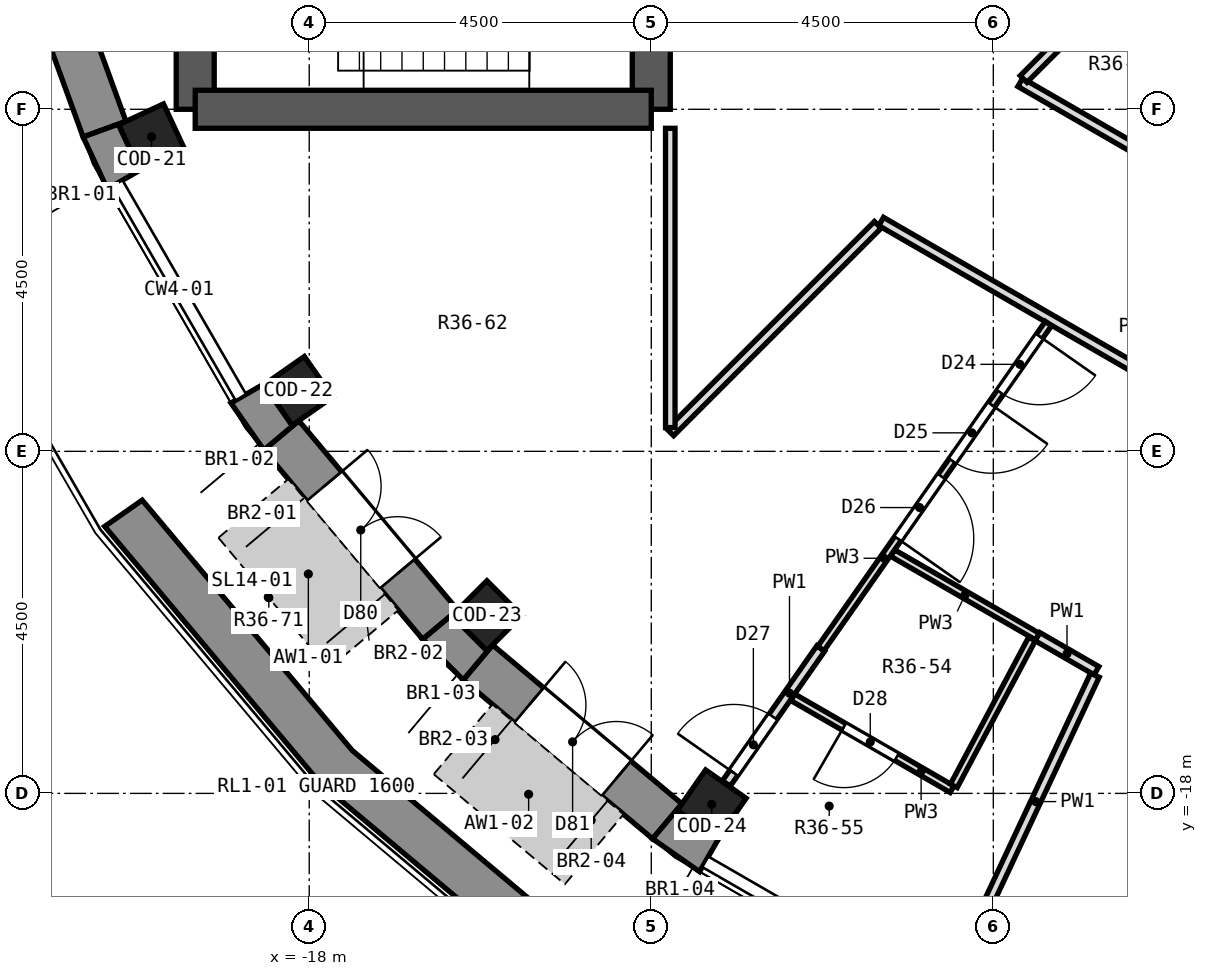
"""IFC4 building model, lengths in metres.
Left out: names, types, materials, properties, quantities, classifications, styles, units other than length and angle.
Written with IfcOpenShell. Run it as: python <this file> out.ifc"""

import sys

from ifc_helpers import new_model, si_unit, direction, frame, frame_2d, origin, origin_2d, place, context, subcontext, project, spatial, polyline, rectangle, outline, extrude, element, fill, save


model = new_model("IFC4")
c1 = context("Model", 3, precision=1e-05, world=origin(), true_north=direction((0.0, 1.0)))
c2 = subcontext(c1, "Body", "Model", "MODEL_VIEW")
j1 = project(units=[si_unit("LENGTHUNIT", "METRE"), si_unit("PLANEANGLEUNIT", "RADIAN")], contexts=[c1])
p1 = place(None, origin())
s1 = spatial("IfcSite", under=j1, at=p1, CompositionType="ELEMENT")
p2 = place(p1, origin())
s2 = spatial("IfcBuilding", under=s1, at=p2, CompositionType="ELEMENT")
p3 = place(p2, frame((0.0, 0.0, 259.4)))
s3 = spatial("IfcBuildingStorey", under=s2, at=p3, CompositionType="ELEMENT", Elevation=259.4)
for number, where, z_axis, x_axis in (
    (1, (-20.075, -9.361, 0.0), (0.0, 0.0, 1.0), (-0.906, -0.423, 0.0)),
    (2, (-18.144, -12.705, 0.0), (0.0, 0.0, 1.0), (-0.819, -0.574, 0.0)),
    (3, (-15.662, -15.662, 0.0), (0.0, 0.0, 1.0), (-0.707, -0.707, 0.0)),
    (4, (-12.705, -18.144, 0.0), (0.0, 0.0, 1.0), (-0.574, -0.819, 0.0)),
):
    element("IfcColumn", number, at=place(p3, frame(where, z_axis=z_axis, x_axis=x_axis)), inside=s3, PredefinedType="COLUMN", context=c2, shape_type="SweptSolid", body=[
        extrude(rectangle(XDim=0.65, YDim=0.65, at=origin_2d()), origin(), (0.0, 0.0, 1.0), 3.3),
    ])
p4 = place(p3, frame((-13.5, -9.0, 0.0), z_axis=(0.0, 0.0, 1.0), x_axis=(0.0, 1.0, 0.0)))
e5 = element("IfcWall", 5, at=p4, inside=s3, PredefinedType="SHEAR", context=c2, shape_type="SweptSolid", body=[
    extrude(rectangle(XDim=18.0, YDim=0.5, at=frame_2d((9.0, 0.0))), origin(), (0.0, 0.0, 1.0), 3.3),
])
p5 = place(p4, frame((15.4, 0.0, 0.0)))
e6 = element("IfcOpeningElement", 6, at=p5, cuts=e5, PredefinedType="OPENING", context=c2, shape_type="SweptSolid", body=[
    extrude(rectangle(XDim=1.2, YDim=2.1, at=frame_2d((0.6, 1.05))), frame((0.0, 0.262, 0.0), z_axis=(0.0, -1.0, 0.0), x_axis=(1.0, 0.0, 0.0)), (0.0, 0.0, 1.0), 0.524),
])
p6 = place(p4, frame((1.4, 0.0, 0.0)))
e7 = element("IfcOpeningElement", 7, at=p6, cuts=e5, PredefinedType="OPENING", context=c2, shape_type="SweptSolid", body=[
    extrude(rectangle(XDim=1.2, YDim=2.1, at=frame_2d((0.6, 1.05))), frame((0.0, 0.262, 0.0), z_axis=(0.0, -1.0, 0.0), x_axis=(1.0, 0.0, 0.0)), (0.0, 0.0, 1.0), 0.524),
])
p7 = place(p4, frame((7.5, 0.0, 0.0)))
e8 = element("IfcOpeningElement", 8, at=p7, cuts=e5, PredefinedType="OPENING", context=c2, shape_type="SweptSolid", body=[
    extrude(rectangle(XDim=3.0, YDim=2.4, at=frame_2d((1.5, 1.2))), frame((0.0, 0.262, 0.0), z_axis=(0.0, -1.0, 0.0), x_axis=(1.0, 0.0, 0.0)), (0.0, 0.0, 1.0), 0.524),
])
p8 = place(p3, frame((-19.5, -9.0, 0.0), z_axis=(0.0, 0.0, 1.0), x_axis=(0.0, 1.0, 0.0)))
e9 = element("IfcWall", 9, at=p8, inside=s3, PredefinedType="SHEAR", context=c2, shape_type="SweptSolid", body=[
    extrude(rectangle(XDim=18.0, YDim=0.5, at=frame_2d((9.0, 0.0))), origin(), (0.0, 0.0, 1.0), 3.3),
])
p9 = place(p8, frame((9.45, 0.0, 0.0)))
e10 = element("IfcOpeningElement", 10, at=p9, cuts=e9, PredefinedType="OPENING", context=c2, shape_type="SweptSolid", body=[
    extrude(rectangle(XDim=0.9, YDim=2.1, at=frame_2d((0.45, 1.05))), frame((0.0, 0.262, 0.0), z_axis=(0.0, -1.0, 0.0), x_axis=(1.0, 0.0, 0.0)), (0.0, 0.0, 1.0), 0.524),
])
p10 = place(p8, frame((7.65, 0.0, 0.0)))
e11 = element("IfcOpeningElement", 11, at=p10, cuts=e9, PredefinedType="OPENING", context=c2, shape_type="SweptSolid", body=[
    extrude(rectangle(XDim=0.9, YDim=2.1, at=frame_2d((0.45, 1.05))), frame((0.0, 0.262, 0.0), z_axis=(0.0, -1.0, 0.0), x_axis=(1.0, 0.0, 0.0)), (0.0, 0.0, 1.0), 0.524),
])
p11 = place(p3, frame((-13.5, -9.0, 0.0), z_axis=(0.0, 0.0, 1.0), x_axis=(-1.0, 0.0, 0.0)))
e12 = element("IfcWall", 12, at=p11, inside=s3, PredefinedType="SHEAR", context=c2, shape_type="SweptSolid", body=[
    extrude(rectangle(XDim=6.0, YDim=0.5, at=frame_2d((3.0, 0.0))), origin(), (0.0, 0.0, 1.0), 3.3),
])
p12 = place(p3, frame((-21.805, -6.206, 0.0), z_axis=(0.0, 0.0, 1.0), x_axis=(0.342056509473, -0.939679383794, 0.0)))
e13 = element("IfcWall", 13, at=p12, inside=s3, PredefinedType="SOLIDWALL", context=c2, shape_type="SweptSolid", body=[
    extrude(rectangle(XDim=3.252, YDim=0.6, at=frame_2d((1.626, 0.0))), origin(), (0.0, 0.0, 1.0), 2.9),
])
p13 = place(p3, frame((-18.367, -13.29, 0.0), z_axis=(0.0, 0.0, 1.0), x_axis=(0.64277291405, -0.766056773982, 0.0)))
e14 = element("IfcWall", 14, at=p13, inside=s3, PredefinedType="SOLIDWALL", context=c2, shape_type="SweptSolid", body=[
    extrude(rectangle(XDim=3.252, YDim=0.6, at=frame_2d((1.626, 0.0))), origin(), (0.0, 0.0, 1.0), 2.9),
])
p14 = place(p13, frame((0.876, 0.0, 0.0)))
e15 = element("IfcOpeningElement", 15, at=p14, cuts=e14, PredefinedType="OPENING", context=c2, shape_type="SweptSolid", body=[
    extrude(rectangle(XDim=1.5, YDim=2.4, at=frame_2d((0.75, 1.2))), frame((0.0, 0.312, 0.0), z_axis=(0.0, -1.0, 0.0), x_axis=(1.0, 0.0, 0.0)), (0.0, 0.0, 1.0), 0.624),
])
p15 = place(p3, frame((-15.781, -16.277, 0.0), z_axis=(0.0, 0.0, 1.0), x_axis=(0.766056773982, -0.64277291405, 0.0)))
e16 = element("IfcWall", 16, at=p15, inside=s3, PredefinedType="SOLIDWALL", context=c2, shape_type="SweptSolid", body=[
    extrude(rectangle(XDim=3.252, YDim=0.6, at=frame_2d((1.626, 0.0))), origin(), (0.0, 0.0, 1.0), 2.9),
])
p16 = place(p15, frame((0.876, 0.0, 0.0)))
e17 = element("IfcOpeningElement", 17, at=p16, cuts=e16, PredefinedType="OPENING", context=c2, shape_type="SweptSolid", body=[
    extrude(rectangle(XDim=1.5, YDim=2.4, at=frame_2d((0.75, 1.2))), frame((0.0, 0.312, 0.0), z_axis=(0.0, -1.0, 0.0), x_axis=(1.0, 0.0, 0.0)), (0.0, 0.0, 1.0), 0.624),
])
p17 = place(p3, origin())
e18 = element("IfcWall", 18, at=p17, inside=s3, PredefinedType="SOLIDWALL", context=c2, shape_type="SweptSolid", body=[
    extrude(outline(polyline([(-20.975, -9.364), (-20.656, -10.048), (-20.136, -9.748), (-20.232, -9.793), (-20.507, -9.204), (-20.411, -9.159), (-20.975, -9.364)])), origin(), (0.0, 0.0, 1.0), 2.9),
])
p18 = place(p3, origin())
e19 = element("IfcWall", 19, at=p18, inside=s3, PredefinedType="SOLIDWALL", context=c2, shape_type="SweptSolid", body=[
    extrude(outline(polyline([(-19.03, -12.864), (-18.597, -13.482), (-18.137, -13.097), (-18.224, -13.157), (-18.597, -12.625), (-18.51, -12.564), (-19.03, -12.864)])), origin(), (0.0, 0.0, 1.0), 2.9),
])
p19 = place(p3, origin())
e20 = element("IfcWall", 20, at=p19, inside=s3, PredefinedType="SOLIDWALL", context=c2, shape_type="SweptSolid", body=[
    extrude(outline(polyline([(-15.973, -16.507), (-15.588, -16.047), (-15.662, -16.122), (-16.122, -15.662), (-16.047, -15.588), (-16.507, -15.973), (-15.973, -16.507)])), origin(), (0.0, 0.0, 1.0), 2.9),
])
p20 = place(p3, origin())
e21 = element("IfcWall", 21, at=p20, inside=s3, PredefinedType="SOLIDWALL", context=c2, shape_type="SweptSolid", body=[
    extrude(outline(polyline([(-12.864, -19.03), (-12.564, -18.51), (-12.625, -18.597), (-13.157, -18.224), (-13.097, -18.137), (-13.482, -18.597), (-12.864, -19.03)])), origin(), (0.0, 0.0, 1.0), 2.9),
])
p21 = place(p3, origin())
e22 = element("IfcWall", 22, at=p21, inside=s3, PredefinedType="PARAPET", context=c2, shape_type="SweptSolid", body=[
    extrude(outline(polyline([(-20.691, -14.488), (-17.861, -17.861), (-14.488, -20.691), (-14.142, -20.197), (-17.435, -17.435), (-20.197, -14.142), (-20.691, -14.488)])), origin(), (0.0, 0.0, 1.0), 0.5),
])
p22 = place(p3, frame((-11.639, -16.735, 0.0), z_axis=(0.0, 0.0, 1.0), x_axis=(0.866093196455, -0.499882561262, 0.0)))
e23 = element("IfcWall", 23, at=p22, inside=s3, PredefinedType="PARTITIONING", context=c2, shape_type="SweptSolid", body=[
    extrude(rectangle(XDim=2.42, YDim=0.1, at=frame_2d((1.21, 0.0))), origin(), (0.0, 0.0, 1.0), 2.9),
])
p23 = place(p22, frame((0.778, 0.0, 0.0)))
e24 = element("IfcOpeningElement", 24, at=p23, cuts=e23, PredefinedType="OPENING", context=c2, shape_type="SweptSolid", body=[
    extrude(rectangle(XDim=0.8, YDim=2.1, at=frame_2d((0.4, 1.05))), frame((0.0, 0.062, 0.0), z_axis=(0.0, -1.0, 0.0), x_axis=(1.0, 0.0, 0.0)), (0.0, 0.0, 1.0), 0.124),
])
p24 = place(p3, frame((-10.324, -14.838, 0.0), z_axis=(0.0, 0.0, 1.0), x_axis=(0.866035918664, -0.499981787252, 0.0)))
e25 = element("IfcWall", 25, at=p24, inside=s3, PredefinedType="PARTITIONING", context=c2, shape_type="SweptSolid", body=[
    extrude(rectangle(XDim=2.2, YDim=0.1, at=frame_2d((1.1, 0.0))), origin(), (0.0, 0.0, 1.0), 2.9),
])
p25 = place(p3, frame((-8.419, -15.938, 0.0), z_axis=(0.0, 0.0, 1.0), x_axis=(0.866053945006, -0.499950561895, 0.0)))
e26 = element("IfcWall", 26, at=p25, inside=s3, PredefinedType="PARTITIONING", context=c2, shape_type="SweptSolid", body=[
    extrude(rectangle(XDim=0.896, YDim=0.125, at=frame_2d((0.448, 0.0))), origin(), (0.0, 0.0, 1.0), 2.9),
])
p26 = place(p3, frame((-10.476, -10.476, 0.0), z_axis=(0.0, 0.0, 1.0), x_axis=(0.866073222863, -0.499917165778, 0.0)))
e27 = element("IfcWall", 27, at=p26, inside=s3, PredefinedType="PARTITIONING", context=c2, shape_type="SweptSolid", body=[
    extrude(rectangle(XDim=7.742, YDim=0.125, at=frame_2d((3.871, 0.0))), origin(), (0.0, 0.0, 1.0), 2.9),
])
p27 = place(p3, frame((-8.646, -8.646, 0.0), z_axis=(0.0, 0.0, 1.0), x_axis=(0.866085253322, -0.49989632323, 0.0)))
e28 = element("IfcWall", 28, at=p27, inside=s3, PredefinedType="PARTITIONING", context=c2, shape_type="SweptSolid", body=[
    extrude(rectangle(XDim=6.402, YDim=0.125, at=frame_2d((3.201, 0.0))), origin(), (0.0, 0.0, 1.0), 2.9),
])
p28 = place(p27, frame((2.614, 0.0, 0.0)))
e29 = element("IfcOpeningElement", 29, at=p28, cuts=e28, PredefinedType="OPENING", context=c2, shape_type="SweptSolid", body=[
    extrude(rectangle(XDim=1.0, YDim=2.1, at=frame_2d((0.5, 1.05))), frame((0.0, 0.074, 0.0), z_axis=(0.0, -1.0, 0.0), x_axis=(1.0, 0.0, 0.0)), (0.0, 0.0, 1.0), 0.149),
])
p29 = place(p3, frame((-13.25, -13.25, 0.0), z_axis=(0.0, 0.0, 1.0), x_axis=(0.707106781187, 0.707106781187, 0.0)))
e30 = element("IfcWall", 30, at=p29, inside=s3, PredefinedType="PARTITIONING", context=c2, shape_type="SweptSolid", body=[
    extrude(rectangle(XDim=3.86, YDim=0.125, at=frame_2d((1.93, 0.0))), origin(), (0.0, 0.0, 1.0), 2.9),
])
p30 = place(p3, frame((-8.602, -8.602, 0.0), z_axis=(0.0, 0.0, 1.0), x_axis=(0.707106781187, 0.707106781187, 0.0)))
e31 = element("IfcWall", 31, at=p30, inside=s3, PredefinedType="PARTITIONING", context=c2, shape_type="SweptSolid", body=[
    extrude(rectangle(XDim=2.722, YDim=0.125, at=frame_2d((1.361, 0.0))), origin(), (0.0, 0.0, 1.0), 2.9),
])
p31 = place(p3, frame((-12.513, -17.87, 0.0), z_axis=(0.0, 0.0, 1.0), x_axis=(0.573296063173, 0.819348292212, 0.0)))
e32 = element("IfcWall", 32, at=p31, inside=s3, PredefinedType="PARTITIONING", context=c2, shape_type="SweptSolid", body=[
    extrude(rectangle(XDim=2.168, YDim=0.125, at=frame_2d((1.084, 0.0))), origin(), (0.0, 0.0, 1.0), 2.9),
])
p32 = place(p31, frame((0.171, 0.0, 0.0)))
e33 = element("IfcOpeningElement", 33, at=p32, cuts=e32, PredefinedType="OPENING", context=c2, shape_type="SweptSolid", body=[
    extrude(rectangle(XDim=0.9, YDim=2.1, at=frame_2d((0.45, 1.05))), frame((0.0, 0.074, 0.0), z_axis=(0.0, -1.0, 0.0), x_axis=(1.0, 0.0, 0.0)), (0.0, 0.0, 1.0), 0.149),
])
p33 = place(p3, frame((-11.269, -16.094, 0.0), z_axis=(0.0, 0.0, 1.0), x_axis=(0.573597334784, 0.819137410651, 0.0)))
e34 = element("IfcWall", 34, at=p33, inside=s3, PredefinedType="PARTITIONING", context=c2, shape_type="SweptSolid", body=[
    extrude(rectangle(XDim=5.219, YDim=0.1, at=frame_2d((2.609, 0.0))), origin(), (0.0, 0.0, 1.0), 2.9),
])
p34 = place(p33, frame((4.114, 0.0, 0.0)))
e35 = element("IfcOpeningElement", 35, at=p34, cuts=e34, PredefinedType="OPENING", context=c2, shape_type="SweptSolid", body=[
    extrude(rectangle(XDim=0.9, YDim=2.1, at=frame_2d((0.45, 1.05))), frame((0.0, 0.062, 0.0), z_axis=(0.0, -1.0, 0.0), x_axis=(1.0, 0.0, 0.0)), (0.0, 0.0, 1.0), 0.124),
])
p35 = place(p33, frame((3.014, 0.0, 0.0)))
e36 = element("IfcOpeningElement", 36, at=p35, cuts=e34, PredefinedType="OPENING", context=c2, shape_type="SweptSolid", body=[
    extrude(rectangle(XDim=0.9, YDim=2.1, at=frame_2d((0.45, 1.05))), frame((0.0, 0.062, 0.0), z_axis=(0.0, -1.0, 0.0), x_axis=(1.0, 0.0, 0.0)), (0.0, 0.0, 1.0), 0.124),
])
p36 = place(p33, frame((1.764, 0.0, 0.0)))
e37 = element("IfcOpeningElement", 37, at=p36, cuts=e34, PredefinedType="OPENING", context=c2, shape_type="SweptSolid", body=[
    extrude(rectangle(XDim=1.0, YDim=2.1, at=frame_2d((0.5, 1.05))), frame((0.0, 0.062, 0.0), z_axis=(0.0, -1.0, 0.0), x_axis=(1.0, 0.0, 0.0)), (0.0, 0.0, 1.0), 0.124),
])
p37 = place(p3, frame((-9.52, -17.901, 0.0), z_axis=(0.0, 0.0, 1.0), x_axis=(0.469644416179, 0.882855663374, 0.0)))
e38 = element("IfcWall", 38, at=p37, inside=s3, PredefinedType="PARTITIONING", context=c2, shape_type="SweptSolid", body=[
    extrude(rectangle(XDim=2.189, YDim=0.1, at=frame_2d((1.094, 0.0))), origin(), (0.0, 0.0, 1.0), 2.9),
])
p38 = place(p3, frame((-9.22, -19.771, 0.0), z_axis=(0.0, 0.0, 1.0), x_axis=(0.4238971674, 0.90571032426, 0.0)))
e39 = element("IfcWall", 39, at=p38, inside=s3, PredefinedType="PARTITIONING", context=c2, shape_type="SweptSolid", body=[
    extrude(rectangle(XDim=3.672, YDim=0.125, at=frame_2d((1.836, 0.0))), origin(), (0.0, 0.0, 1.0), 2.9),
])
p39 = place(p3, frame((-13.25, -13.188, 0.0), z_axis=(0.0, 0.0, 1.0), x_axis=(0.0, 1.0, 0.0)))
e40 = element("IfcWall", 40, at=p39, inside=s3, PredefinedType="PARTITIONING", context=c2, shape_type="SweptSolid", body=[
    extrude(rectangle(XDim=3.938, YDim=0.125, at=frame_2d((1.969, 0.0))), origin(), (0.0, 0.0, 1.0), 2.9),
])
p40 = place(p14, origin())
e41 = element("IfcDoor", 41, at=p40, inside=s3, OperationType="DOUBLE_DOOR_SINGLE_SWING", PredefinedType="DOOR", context=c2, shape_type="SweptSolid", body=[
    extrude(rectangle(XDim=1.5, YDim=2.4, at=frame_2d((0.75, 1.2))), frame((0.0, 0.125, 0.0), z_axis=(0.0, -1.0, 0.0), x_axis=(1.0, 0.0, 0.0)), (0.0, 0.0, 1.0), 0.05),
])
fill(e15, e41)
p41 = place(p16, origin())
e42 = element("IfcDoor", 42, at=p41, inside=s3, OperationType="DOUBLE_DOOR_SINGLE_SWING", PredefinedType="DOOR", context=c2, shape_type="SweptSolid", body=[
    extrude(rectangle(XDim=1.5, YDim=2.4, at=frame_2d((0.75, 1.2))), frame((0.0, 0.125, 0.0), z_axis=(0.0, -1.0, 0.0), x_axis=(1.0, 0.0, 0.0)), (0.0, 0.0, 1.0), 0.05),
])
fill(e17, e42)
p42 = place(p34, frame((0.9, 0.0, 0.0), z_axis=(0.0, 0.0, 1.0), x_axis=(-1.0, 0.0, 0.0)))
e43 = element("IfcDoor", 43, at=p42, inside=s3, OperationType="SINGLE_SWING_LEFT", PredefinedType="DOOR", context=c2, shape_type="SweptSolid", body=[
    extrude(rectangle(XDim=0.9, YDim=2.1, at=frame_2d((0.45, 1.05))), frame((0.0, 0.025, 0.0), z_axis=(0.0, -1.0, 0.0), x_axis=(1.0, 0.0, 0.0)), (0.0, 0.0, 1.0), 0.05),
])
fill(e35, e43)
p43 = place(p35, frame((0.9, 0.0, 0.0), z_axis=(0.0, 0.0, 1.0), x_axis=(-1.0, 0.0, 0.0)))
e44 = element("IfcDoor", 44, at=p43, inside=s3, OperationType="SINGLE_SWING_LEFT", PredefinedType="DOOR", context=c2, shape_type="SweptSolid", body=[
    extrude(rectangle(XDim=0.9, YDim=2.1, at=frame_2d((0.45, 1.05))), frame((0.0, 0.025, 0.0), z_axis=(0.0, -1.0, 0.0), x_axis=(1.0, 0.0, 0.0)), (0.0, 0.0, 1.0), 0.05),
])
fill(e36, e44)
p44 = place(p36, frame((1.0, 0.0, 0.0), z_axis=(0.0, 0.0, 1.0), x_axis=(-1.0, 0.0, 0.0)))
e45 = element("IfcDoor", 45, at=p44, inside=s3, OperationType="SINGLE_SWING_RIGHT", PredefinedType="DOOR", context=c2, shape_type="SweptSolid", body=[
    extrude(rectangle(XDim=1.0, YDim=2.1, at=frame_2d((0.5, 1.05))), frame((0.0, 0.025, 0.0), z_axis=(0.0, -1.0, 0.0), x_axis=(1.0, 0.0, 0.0)), (0.0, 0.0, 1.0), 0.05),
])
fill(e37, e45)
p45 = place(p32, origin())
e46 = element("IfcDoor", 46, at=p45, inside=s3, OperationType="SINGLE_SWING_LEFT", PredefinedType="DOOR", context=c2, shape_type="SweptSolid", body=[
    extrude(rectangle(XDim=0.9, YDim=2.1, at=frame_2d((0.45, 1.05))), frame((0.0, 0.025, 0.0), z_axis=(0.0, -1.0, 0.0), x_axis=(1.0, 0.0, 0.0)), (0.0, 0.0, 1.0), 0.05),
])
fill(e33, e46)
p46 = place(p23, frame((0.8, 0.0, 0.0), z_axis=(0.0, 0.0, 1.0), x_axis=(-1.0, 0.0, 0.0)))
e47 = element("IfcDoor", 47, at=p46, inside=s3, OperationType="SINGLE_SWING_RIGHT", PredefinedType="DOOR", context=c2, shape_type="SweptSolid", body=[
    extrude(rectangle(XDim=0.8, YDim=2.1, at=frame_2d((0.4, 1.05))), frame((0.0, 0.025, 0.0), z_axis=(0.0, -1.0, 0.0), x_axis=(1.0, 0.0, 0.0)), (0.0, 0.0, 1.0), 0.05),
])
fill(e24, e47)
save(model, sys.argv[1])
